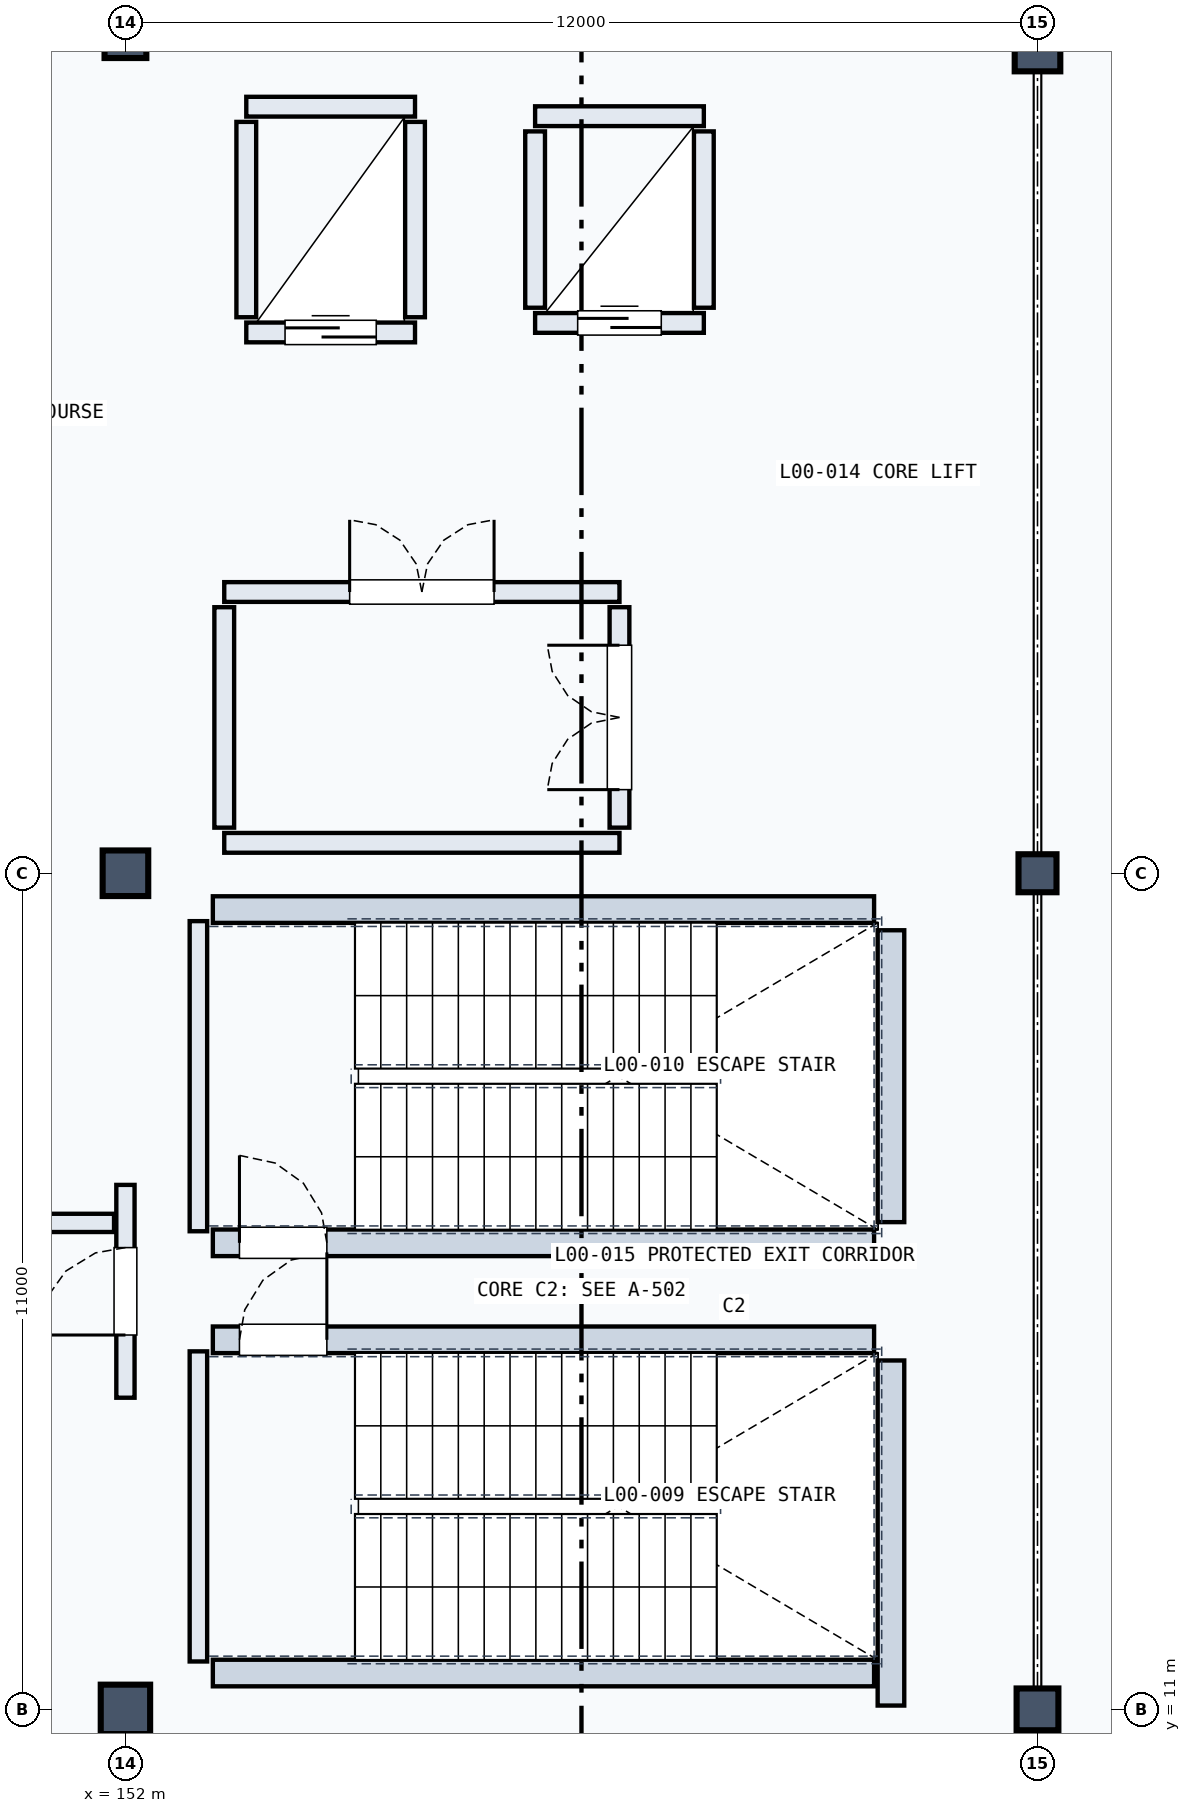
"""IFC4 building model, lengths in metres.
Left out: names, types, materials, properties, quantities, classifications, styles, units other than length and angle.
Written with IfcOpenShell. Run it as: python <this file> out.ifc"""

import sys

from ifc_helpers import new_model, si_unit, direction, frame, frame_2d, origin, origin_2d, place, context, subcontext, project, spatial, rectangle, extrude, element, fill, save


model = new_model("IFC4")
c1 = context("Model", 3, precision=1e-05, world=origin(), true_north=direction((0.0, 1.0)))
c2 = subcontext(c1, "Body", "Model", "MODEL_VIEW")
j1 = project(units=[si_unit("LENGTHUNIT", "METRE"), si_unit("PLANEANGLEUNIT", "RADIAN")], contexts=[c1])
p1 = place(None, origin())
s1 = spatial("IfcSite", under=j1, at=p1, CompositionType="ELEMENT")
p2 = place(p1, origin())
s2 = spatial("IfcBuilding", under=s1, at=p2, CompositionType="ELEMENT")
p3 = place(p2, origin())
s3 = spatial("IfcBuildingStorey", under=s2, at=p3, CompositionType="ELEMENT", Elevation=0.0)
p4 = place(p3, frame((152.0, 11.0, 0.0), z_axis=(0.0, 0.0, 1.0), x_axis=(1.0, 0.0, 0.0)))
e1 = element("IfcColumn", 1, at=p4, inside=s3, PredefinedType="COLUMN", context=c2, shape_type="SweptSolid", body=[
    extrude(rectangle(XDim=0.65, YDim=0.65, at=origin_2d()), origin(), (0.0, 0.0, 1.0), 5.4),
])
p5 = place(p3, frame((152.0, 22.0, 0.0), z_axis=(0.0, 0.0, 1.0), x_axis=(1.0, 0.0, 0.0)))
e2 = element("IfcColumn", 2, at=p5, inside=s3, PredefinedType="COLUMN", context=c2, shape_type="SweptSolid", body=[
    extrude(rectangle(XDim=0.6, YDim=0.6, at=origin_2d()), origin(), (0.0, 0.0, 1.0), 5.4),
])
for number, where, z_axis, x_axis in (
    (3, (152.0, 33.0, 0.0), (0.0, 0.0, 1.0), (1.0, 0.0, 0.0)),
    (4, (164.0, 11.0, 0.0), (0.0, 0.0, 1.0), (1.0, 0.0, 0.0)),
):
    element("IfcColumn", number, at=place(p3, frame(where, z_axis=z_axis, x_axis=x_axis)), inside=s3, PredefinedType="COLUMN", context=c2, shape_type="SweptSolid", body=[
        extrude(rectangle(XDim=0.55, YDim=0.55, at=origin_2d()), origin(), (0.0, 0.0, 1.0), 5.4),
    ])
p6 = place(p3, frame((164.0, 22.0, 0.0), z_axis=(0.0, 0.0, 1.0), x_axis=(1.0, 0.0, 0.0)))
e5 = element("IfcColumn", 5, at=p6, inside=s3, PredefinedType="COLUMN", context=c2, shape_type="SweptSolid", body=[
    extrude(rectangle(XDim=0.5, YDim=0.5, at=origin_2d()), origin(), (0.0, 0.0, 1.0), 5.4),
])
p7 = place(p3, frame((164.0, 33.0, 0.0), z_axis=(0.0, 0.0, 1.0), x_axis=(1.0, 0.0, 0.0)))
e6 = element("IfcColumn", 6, at=p7, inside=s3, PredefinedType="COLUMN", context=c2, shape_type="SweptSolid", body=[
    extrude(rectangle(XDim=0.6, YDim=0.9, at=origin_2d()), origin(), (0.0, 0.0, 1.0), 5.4),
])
p8 = place(p3, frame((152.96, 11.63, 0.0), z_axis=(0.0, 0.0, 1.0), x_axis=(0.0, 1.0, 0.0)))
e7 = element("IfcWall", 7, at=p8, inside=s3, PredefinedType="SOLIDWALL", context=c2, shape_type="SweptSolid", body=[
    extrude(rectangle(XDim=4.08, YDim=0.23, at=frame_2d((2.04, 0.0))), origin(), (0.0, 0.0, 1.0), 5.06),
])
p9 = place(p3, frame((162.072, 11.05, 0.0), z_axis=(0.0, 0.0, 1.0), x_axis=(0.0, 1.0, 0.0)))
e8 = element("IfcWall", 8, at=p9, inside=s3, PredefinedType="SOLIDWALL", context=c2, shape_type="SweptSolid", body=[
    extrude(rectangle(XDim=4.54, YDim=0.35, at=frame_2d((2.27, 0.0))), origin(), (0.0, 0.0, 1.0), 5.06),
])
p10 = place(p3, frame((153.15, 11.478, 0.0), z_axis=(0.0, 0.0, 1.0), x_axis=(1.0, 0.0, 0.0)))
e9 = element("IfcWall", 9, at=p10, inside=s3, PredefinedType="SOLIDWALL", context=c2, shape_type="SweptSolid", body=[
    extrude(rectangle(XDim=8.7, YDim=0.35, at=frame_2d((4.35, 0.0))), origin(), (0.0, 0.0, 1.0), 5.06),
])
p11 = place(p3, frame((153.15, 15.862, 0.0), z_axis=(0.0, 0.0, 1.0), x_axis=(1.0, 0.0, 0.0)))
e10 = element("IfcWall", 10, at=p11, inside=s3, PredefinedType="SOLIDWALL", context=c2, shape_type="SweptSolid", body=[
    extrude(rectangle(XDim=8.7, YDim=0.35, at=frame_2d((4.35, 0.0))), origin(), (0.0, 0.0, 1.0), 5.06),
])
p12 = place(p11, frame((0.35, 0.0, 0.0)))
e11 = element("IfcOpeningElement", 11, at=p12, cuts=e10, PredefinedType="OPENING", context=c2, shape_type="SweptSolid", body=[
    extrude(rectangle(XDim=1.15, YDim=2.2, at=frame_2d((0.575, 1.1))), frame((0.0, 0.185, 0.0), z_axis=(0.0, -1.0, 0.0), x_axis=(1.0, 0.0, 0.0)), (0.0, 0.0, 1.0), 0.37),
])
p13 = place(p3, frame((152.96, 17.29, 0.0), z_axis=(0.0, 0.0, 1.0), x_axis=(0.0, 1.0, 0.0)))
e12 = element("IfcWall", 12, at=p13, inside=s3, PredefinedType="SOLIDWALL", context=c2, shape_type="SweptSolid", body=[
    extrude(rectangle(XDim=4.08, YDim=0.23, at=frame_2d((2.04, 0.0))), origin(), (0.0, 0.0, 1.0), 5.06),
])
p14 = place(p3, frame((162.072, 17.41, 0.0), z_axis=(0.0, 0.0, 1.0), x_axis=(0.0, 1.0, 0.0)))
e13 = element("IfcWall", 13, at=p14, inside=s3, PredefinedType="SOLIDWALL", context=c2, shape_type="SweptSolid", body=[
    extrude(rectangle(XDim=3.84, YDim=0.35, at=frame_2d((1.92, 0.0))), origin(), (0.0, 0.0, 1.0), 5.06),
])
p15 = place(p3, frame((153.15, 17.138, 0.0), z_axis=(0.0, 0.0, 1.0), x_axis=(1.0, 0.0, 0.0)))
e14 = element("IfcWall", 14, at=p15, inside=s3, PredefinedType="SOLIDWALL", context=c2, shape_type="SweptSolid", body=[
    extrude(rectangle(XDim=8.7, YDim=0.35, at=frame_2d((4.35, 0.0))), origin(), (0.0, 0.0, 1.0), 5.06),
])
p16 = place(p15, frame((0.35, 0.0, 0.0)))
e15 = element("IfcOpeningElement", 15, at=p16, cuts=e14, PredefinedType="OPENING", context=c2, shape_type="SweptSolid", body=[
    extrude(rectangle(XDim=1.15, YDim=2.2, at=frame_2d((0.575, 1.1))), frame((0.0, 0.185, 0.0), z_axis=(0.0, -1.0, 0.0), x_axis=(1.0, 0.0, 0.0)), (0.0, 0.0, 1.0), 0.37),
])
p17 = place(p3, frame((153.15, 21.522, 0.0), z_axis=(0.0, 0.0, 1.0), x_axis=(1.0, 0.0, 0.0)))
e16 = element("IfcWall", 16, at=p17, inside=s3, PredefinedType="SOLIDWALL", context=c2, shape_type="SweptSolid", body=[
    extrude(rectangle(XDim=8.7, YDim=0.35, at=frame_2d((4.35, 0.0))), origin(), (0.0, 0.0, 1.0), 5.06),
])
p18 = place(p3, frame((153.59, 29.115, 0.0), z_axis=(0.0, 0.0, 1.0), x_axis=(1.0, 0.0, 0.0)))
e17 = element("IfcWall", 17, at=p18, inside=s3, PredefinedType="SOLIDWALL", context=c2, shape_type="SweptSolid", body=[
    extrude(rectangle(XDim=2.22, YDim=0.26, at=frame_2d((1.11, 0.0))), origin(), (0.0, 0.0, 1.0), 5.06),
])
p19 = place(p18, frame((0.51, 0.0, 0.0)))
e18 = element("IfcOpeningElement", 18, at=p19, cuts=e17, PredefinedType="OPENING", context=c2, shape_type="SweptSolid", body=[
    extrude(rectangle(XDim=1.2, YDim=2.2, at=frame_2d((0.6, 1.1))), frame((0.0, 0.14, 0.0), z_axis=(0.0, -1.0, 0.0), x_axis=(1.0, 0.0, 0.0)), (0.0, 0.0, 1.0), 0.28),
])
p20 = place(p3, frame((153.59, 32.085, 0.0), z_axis=(0.0, 0.0, 1.0), x_axis=(1.0, 0.0, 0.0)))
e19 = element("IfcWall", 19, at=p20, inside=s3, PredefinedType="SOLIDWALL", context=c2, shape_type="SweptSolid", body=[
    extrude(rectangle(XDim=2.22, YDim=0.26, at=frame_2d((1.11, 0.0))), origin(), (0.0, 0.0, 1.0), 5.06),
])
for number, where, z_axis, x_axis in (
    (20, (153.59, 29.315, 0.0), (0.0, 0.0, 1.0), (0.0, 1.0, 0.0)),
    (21, (155.81, 29.315, 0.0), (0.0, 0.0, 1.0), (0.0, 1.0, 0.0)),
):
    element("IfcWall", number, at=place(p3, frame(where, z_axis=z_axis, x_axis=x_axis)), inside=s3, PredefinedType="SOLIDWALL", context=c2, shape_type="SweptSolid", body=[
        extrude(rectangle(XDim=2.57, YDim=0.26, at=frame_2d((1.285, 0.0))), origin(), (0.0, 0.0, 1.0), 5.06),
    ])
p21 = place(p3, frame((157.39, 29.24, 0.0), z_axis=(0.0, 0.0, 1.0), x_axis=(1.0, 0.0, 0.0)))
e22 = element("IfcWall", 22, at=p21, inside=s3, PredefinedType="SOLIDWALL", context=c2, shape_type="SweptSolid", body=[
    extrude(rectangle(XDim=2.22, YDim=0.26, at=frame_2d((1.11, 0.0))), origin(), (0.0, 0.0, 1.0), 5.06),
])
p22 = place(p21, frame((0.56, 0.0, 0.0)))
e23 = element("IfcOpeningElement", 23, at=p22, cuts=e22, PredefinedType="OPENING", context=c2, shape_type="SweptSolid", body=[
    extrude(rectangle(XDim=1.1, YDim=2.15, at=frame_2d((0.55, 1.075))), frame((0.0, 0.14, 0.0), z_axis=(0.0, -1.0, 0.0), x_axis=(1.0, 0.0, 0.0)), (0.0, 0.0, 1.0), 0.28),
])
p23 = place(p3, frame((157.39, 31.96, 0.0), z_axis=(0.0, 0.0, 1.0), x_axis=(1.0, 0.0, 0.0)))
e24 = element("IfcWall", 24, at=p23, inside=s3, PredefinedType="SOLIDWALL", context=c2, shape_type="SweptSolid", body=[
    extrude(rectangle(XDim=2.22, YDim=0.26, at=frame_2d((1.11, 0.0))), origin(), (0.0, 0.0, 1.0), 5.06),
])
for number, where, z_axis, x_axis in (
    (25, (157.39, 29.44, 0.0), (0.0, 0.0, 1.0), (0.0, 1.0, 0.0)),
    (26, (159.61, 29.44, 0.0), (0.0, 0.0, 1.0), (0.0, 1.0, 0.0)),
):
    element("IfcWall", number, at=place(p3, frame(where, z_axis=z_axis, x_axis=x_axis)), inside=s3, PredefinedType="SOLIDWALL", context=c2, shape_type="SweptSolid", body=[
        extrude(rectangle(XDim=2.32, YDim=0.26, at=frame_2d((1.16, 0.0))), origin(), (0.0, 0.0, 1.0), 5.06),
    ])
p24 = place(p3, frame((153.3, 25.7, 0.0), z_axis=(0.0, 0.0, 1.0), x_axis=(1.0, 0.0, 0.0)))
e27 = element("IfcWall", 27, at=p24, inside=s3, PredefinedType="SOLIDWALL", context=c2, shape_type="SweptSolid", body=[
    extrude(rectangle(XDim=5.2, YDim=0.26, at=frame_2d((2.6, 0.0))), origin(), (0.0, 0.0, 1.0), 5.06),
])
p25 = place(p24, frame((1.65, 0.0, 0.0)))
e28 = element("IfcOpeningElement", 28, at=p25, cuts=e27, PredefinedType="OPENING", context=c2, shape_type="SweptSolid", body=[
    extrude(rectangle(XDim=1.9, YDim=2.2, at=frame_2d((0.95, 1.1))), frame((0.0, 0.14, 0.0), z_axis=(0.0, -1.0, 0.0), x_axis=(1.0, 0.0, 0.0)), (0.0, 0.0, 1.0), 0.28),
])
p26 = place(p3, frame((153.3, 22.4, 0.0), z_axis=(0.0, 0.0, 1.0), x_axis=(1.0, 0.0, 0.0)))
e29 = element("IfcWall", 29, at=p26, inside=s3, PredefinedType="SOLIDWALL", context=c2, shape_type="SweptSolid", body=[
    extrude(rectangle(XDim=5.2, YDim=0.26, at=frame_2d((2.6, 0.0))), origin(), (0.0, 0.0, 1.0), 4.366),
])
p27 = place(p3, frame((153.3, 22.6, 0.0), z_axis=(0.0, 0.0, 1.0), x_axis=(0.0, 1.0, 0.0)))
e30 = element("IfcWall", 30, at=p27, inside=s3, PredefinedType="SOLIDWALL", context=c2, shape_type="SweptSolid", body=[
    extrude(rectangle(XDim=2.9, YDim=0.26, at=frame_2d((1.45, 0.0))), origin(), (0.0, 0.0, 1.0), 5.06),
])
p28 = place(p3, frame((158.5, 22.6, 0.0), z_axis=(0.0, 0.0, 1.0), x_axis=(0.0, 1.0, 0.0)))
e31 = element("IfcWall", 31, at=p28, inside=s3, PredefinedType="SOLIDWALL", context=c2, shape_type="SweptSolid", body=[
    extrude(rectangle(XDim=2.9, YDim=0.26, at=frame_2d((1.45, 0.0))), origin(), (0.0, 0.0, 1.0), 5.06),
])
p29 = place(p28, frame((0.5, 0.0, 0.0)))
e32 = element("IfcOpeningElement", 32, at=p29, cuts=e31, PredefinedType="OPENING", context=c2, shape_type="SweptSolid", body=[
    extrude(rectangle(XDim=1.9, YDim=2.2, at=frame_2d((0.95, 1.1))), frame((0.0, 0.14, 0.0), z_axis=(0.0, -1.0, 0.0), x_axis=(1.0, 0.0, 0.0)), (0.0, 0.0, 1.0), 0.28),
])
p30 = place(p3, frame((152.0, 2.4, 0.0), z_axis=(0.0, 0.0, 1.0), x_axis=(0.0, 1.0, 0.0)))
e33 = element("IfcWall", 33, at=p30, inside=s3, PredefinedType="PARTITIONING", context=c2, shape_type="SweptSolid", body=[
    extrude(rectangle(XDim=8.38, YDim=0.14, at=frame_2d((4.19, 0.0))), origin(), (0.0, 0.0, 1.0), 4.3),
])
p31 = place(p30, frame((3.71, 0.0, 0.0)))
e34 = element("IfcOpeningElement", 34, at=p31, cuts=e33, PredefinedType="OPENING", context=c2, shape_type="SweptSolid", body=[
    extrude(rectangle(XDim=0.96, YDim=2.15, at=frame_2d((0.48, 1.075))), frame((0.0, 0.08, 0.0), z_axis=(0.0, -1.0, 0.0), x_axis=(1.0, 0.0, 0.0)), (0.0, 0.0, 1.0), 0.16),
])
p32 = place(p3, frame((164.0, 2.4, 0.0), z_axis=(0.0, 0.0, 1.0), x_axis=(0.0, 1.0, 0.0)))
e35 = element("IfcWall", 35, at=p32, inside=s3, PredefinedType="PARTITIONING", context=c2, shape_type="SweptSolid", body=[
    extrude(rectangle(XDim=8.38, YDim=0.12, at=frame_2d((4.19, 0.0))), origin(), (0.0, 0.0, 1.0), 4.35),
])
p33 = place(p3, frame((146.8, 17.4, 0.0), z_axis=(0.0, 0.0, 1.0), x_axis=(1.0, 0.0, 0.0)))
e36 = element("IfcWall", 36, at=p33, inside=s3, PredefinedType="PARTITIONING", context=c2, shape_type="SweptSolid", body=[
    extrude(rectangle(XDim=5.05, YDim=0.24, at=frame_2d((2.525, 0.0))), origin(), (0.0, 0.0, 1.0), 4.45),
])
p34 = place(p3, frame((152.0, 15.1, 0.0), z_axis=(0.0, 0.0, 1.0), x_axis=(0.0, 1.0, 0.0)))
e37 = element("IfcWall", 37, at=p34, inside=s3, PredefinedType="PARTITIONING", context=c2, shape_type="SweptSolid", body=[
    extrude(rectangle(XDim=2.8, YDim=0.24, at=frame_2d((1.4, 0.0))), origin(), (0.0, 0.0, 1.0), 4.45),
])
p35 = place(p34, frame((0.825, 0.0, 0.0)))
e38 = element("IfcOpeningElement", 38, at=p35, cuts=e37, PredefinedType="OPENING", context=c2, shape_type="SweptSolid", body=[
    extrude(rectangle(XDim=1.15, YDim=2.2, at=frame_2d((0.575, 1.1))), frame((0.0, 0.13, 0.0), z_axis=(0.0, -1.0, 0.0), x_axis=(1.0, 0.0, 0.0)), (0.0, 0.0, 1.0), 0.26),
])
p36 = place(p12, origin())
e39 = element("IfcDoor", 39, at=p36, inside=s3, OperationType="SINGLE_SWING_RIGHT", PredefinedType="DOOR", context=c2, shape_type="SweptSolid", body=[
    extrude(rectangle(XDim=1.15, YDim=2.2, at=frame_2d((0.575, 1.1))), frame((0.0, 0.025, 0.0), z_axis=(0.0, -1.0, 0.0), x_axis=(1.0, 0.0, 0.0)), (0.0, 0.0, 1.0), 0.05),
])
fill(e11, e39)
p37 = place(p16, origin())
e40 = element("IfcDoor", 40, at=p37, inside=s3, OperationType="SINGLE_SWING_LEFT", PredefinedType="DOOR", context=c2, shape_type="SweptSolid", body=[
    extrude(rectangle(XDim=1.15, YDim=2.2, at=frame_2d((0.575, 1.1))), frame((0.0, 0.025, 0.0), z_axis=(0.0, -1.0, 0.0), x_axis=(1.0, 0.0, 0.0)), (0.0, 0.0, 1.0), 0.05),
])
fill(e15, e40)
p38 = place(p19, origin())
e41 = element("IfcDoor", 41, at=p38, inside=s3, OperationType="SLIDING_TO_LEFT", PredefinedType="DOOR", context=c2, shape_type="SweptSolid", body=[
    extrude(rectangle(XDim=1.2, YDim=2.2, at=frame_2d((0.6, 1.1))), frame((0.0, 0.025, 0.0), z_axis=(0.0, -1.0, 0.0), x_axis=(1.0, 0.0, 0.0)), (0.0, 0.0, 1.0), 0.05),
])
fill(e18, e41)
p39 = place(p22, origin())
e42 = element("IfcDoor", 42, at=p39, inside=s3, OperationType="SLIDING_TO_LEFT", PredefinedType="DOOR", context=c2, shape_type="SweptSolid", body=[
    extrude(rectangle(XDim=1.1, YDim=2.15, at=frame_2d((0.55, 1.075))), frame((0.0, 0.025, 0.0), z_axis=(0.0, -1.0, 0.0), x_axis=(1.0, 0.0, 0.0)), (0.0, 0.0, 1.0), 0.05),
])
fill(e23, e42)
p40 = place(p25, origin())
e43 = element("IfcDoor", 43, at=p40, inside=s3, OperationType="DOUBLE_DOOR_SINGLE_SWING", PredefinedType="DOOR", context=c2, shape_type="SweptSolid", body=[
    extrude(rectangle(XDim=1.9, YDim=2.2, at=frame_2d((0.95, 1.1))), frame((0.0, 0.025, 0.0), z_axis=(0.0, -1.0, 0.0), x_axis=(1.0, 0.0, 0.0)), (0.0, 0.0, 1.0), 0.05),
])
fill(e28, e43)
p41 = place(p29, origin())
e44 = element("IfcDoor", 44, at=p41, inside=s3, OperationType="DOUBLE_DOOR_SINGLE_SWING", PredefinedType="DOOR", context=c2, shape_type="SweptSolid", body=[
    extrude(rectangle(XDim=1.9, YDim=2.2, at=frame_2d((0.95, 1.1))), frame((0.0, 0.025, 0.0), z_axis=(0.0, -1.0, 0.0), x_axis=(1.0, 0.0, 0.0)), (0.0, 0.0, 1.0), 0.05),
])
fill(e32, e44)
p42 = place(p35, origin())
e45 = element("IfcDoor", 45, at=p42, inside=s3, OperationType="SINGLE_SWING_LEFT", PredefinedType="DOOR", context=c2, shape_type="SweptSolid", body=[
    extrude(rectangle(XDim=1.15, YDim=2.2, at=frame_2d((0.575, 1.1))), frame((0.0, 0.025, 0.0), z_axis=(0.0, -1.0, 0.0), x_axis=(1.0, 0.0, 0.0)), (0.0, 0.0, 1.0), 0.05),
])
fill(e38, e45)
save(model, sys.argv[1])
